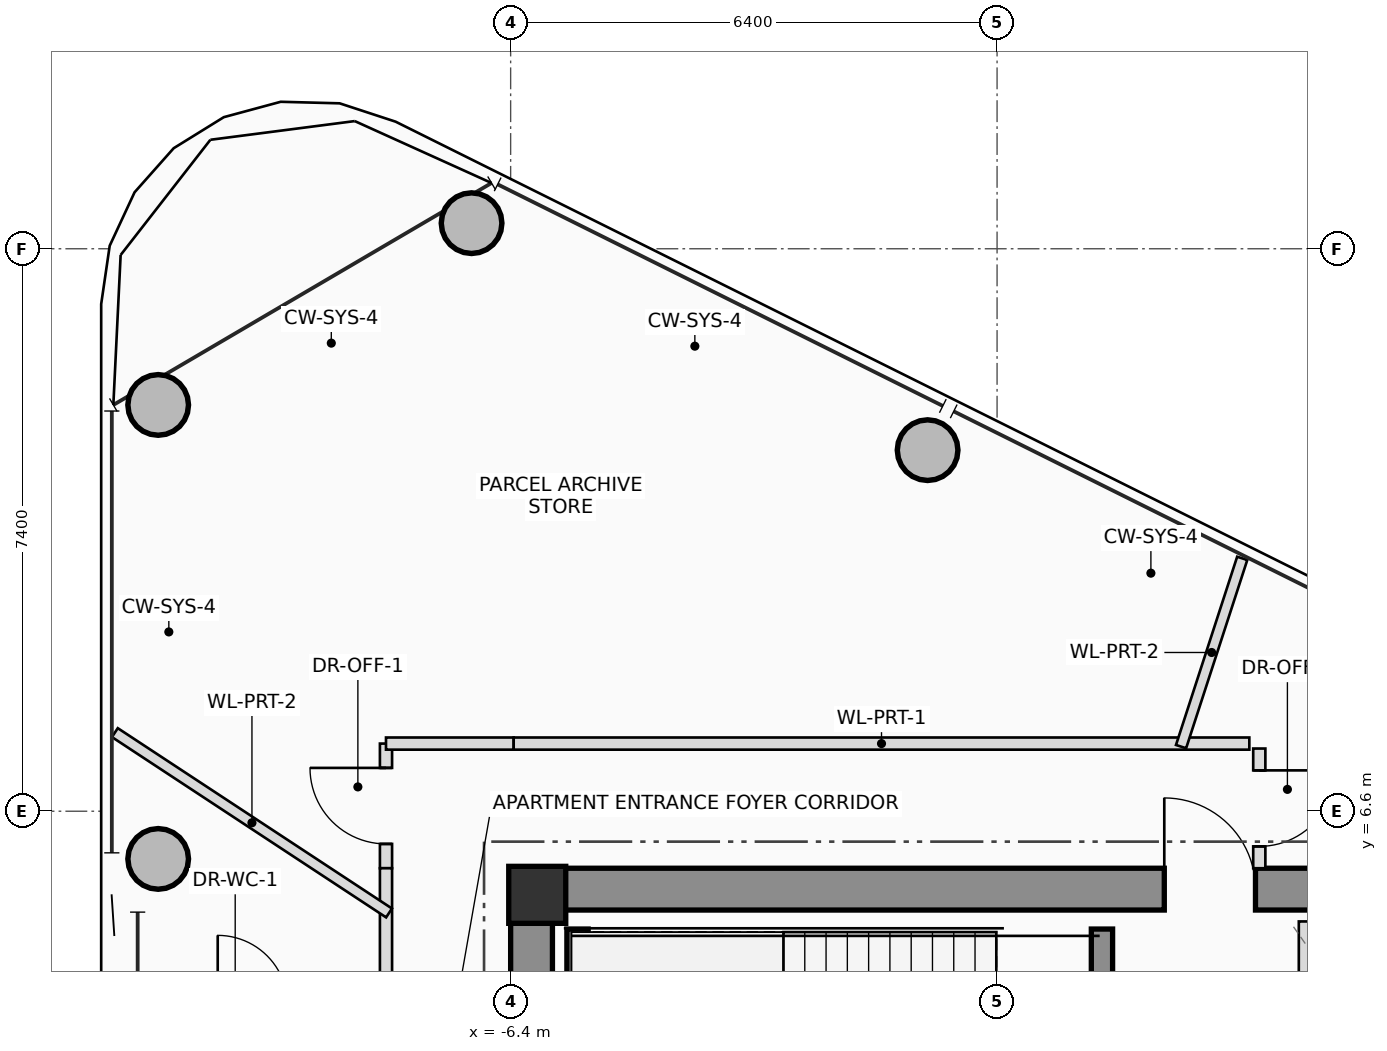
"""IFC4 building model, lengths in metres.
Left out: names, types, materials, properties, quantities, classifications, styles, units other than length and angle.
Written with IfcOpenShell. Run it as: python <this file> out.ifc"""

import sys

from ifc_helpers import new_model, si_unit, direction, frame, frame_2d, origin, origin_2d, place, context, subcontext, project, spatial, rectangle, hollow_circle, extrude, source, transform, mapped, element, fill, save


model = new_model("IFC4")
c1 = context("Model", 3, precision=1e-05, world=origin(), true_north=direction((0.0, 1.0)))
c2 = subcontext(c1, "Body", "Model", "MODEL_VIEW")
j1 = project(units=[si_unit("LENGTHUNIT", "METRE"), si_unit("PLANEANGLEUNIT", "RADIAN")], contexts=[c1])
p1 = place(None, origin())
s1 = spatial("IfcSite", under=j1, at=p1, CompositionType="ELEMENT")
p2 = place(p1, origin())
s2 = spatial("IfcBuilding", under=s1, at=p2, CompositionType="ELEMENT")
p3 = place(p2, frame((0.0, 0.0, 289.85)))
s3 = spatial("IfcBuildingStorey", under=s2, at=p3, CompositionType="ELEMENT", Elevation=289.85)
m1 = source(origin(), c2, "Body", "SweptSolid", [
    extrude(rectangle(XDim=0.75, YDim=0.75, at=origin_2d()), origin(), (0.0, 0.0, 1.0), 3.45),
])
p4 = place(p3, frame((-6.05, 5.5, 0.0), z_axis=(0.0, 0.0, 1.0), x_axis=(1.0, 0.0, 0.0)))
e1 = element("IfcColumn", 1, at=p4, inside=s3, PredefinedType="COLUMN", context=c2, shape_type="MappedRepresentation", body=[
    mapped(m1, transform((0.0, 0.0, 0.0), scale=1.0)),
])
p5 = place(p3, frame((-6.4, 5.575, 0.0), z_axis=(0.0, 0.0, 1.0), x_axis=(1.0, 0.0, 0.0)))
e2 = element("IfcWall", 2, at=p5, inside=s3, PredefinedType="SHEAR", context=c2, shape_type="SweptSolid", body=[
    extrude(rectangle(XDim=12.8, YDim=0.55, at=frame_2d((6.4, 0.0))), origin(), (0.0, 0.0, 1.0), 3.45),
])
p6 = place(p5, frame((8.6, 0.0, 0.0)))
e3 = element("IfcOpeningElement", 3, at=p6, cuts=e2, PredefinedType="OPENING", context=c2, shape_type="SweptSolid", body=[
    extrude(rectangle(XDim=1.2, YDim=2.2, at=frame_2d((0.6, 1.1))), frame((0.0, 0.285, 0.0), z_axis=(0.0, -1.0, 0.0), x_axis=(1.0, 0.0, 0.0)), (0.0, 0.0, 1.0), 0.57),
])
p7 = place(p3, frame((-6.125, 1.75, 0.0), z_axis=(0.0, 0.0, 1.0), x_axis=(0.0, 1.0, 0.0)))
e4 = element("IfcWall", 4, at=p7, inside=s3, PredefinedType="SHEAR", context=c2, shape_type="SweptSolid", body=[
    extrude(rectangle(XDim=3.55, YDim=0.55, at=frame_2d((1.775, 0.0))), origin(), (0.0, 0.0, 1.0), 3.45),
])
p8 = place(p3, frame((-5.52, 2.3, 0.0), z_axis=(0.0, 0.0, 1.0), x_axis=(0.0, 1.0, 0.0)))
e5 = element("IfcWall", 5, at=p8, inside=s3, PredefinedType="SHEAR", context=c2, shape_type="SweptSolid", body=[
    extrude(rectangle(XDim=2.75, YDim=0.28, at=frame_2d((1.375, 0.0))), origin(), (0.0, 0.0, 1.0), 3.45),
])
p9 = place(p3, frame((1.38, 4.25, 0.0), z_axis=(0.0, 0.0, 1.0), x_axis=(0.0, 1.0, 0.0)))
e6 = element("IfcWall", 6, at=p9, inside=s3, PredefinedType="SHEAR", context=c2, shape_type="SweptSolid", body=[
    extrude(rectangle(XDim=0.8, YDim=0.28, at=frame_2d((0.4, 0.0))), origin(), (0.0, 0.0, 1.0), 3.45),
])
m2 = source(origin(), c2, "Body", "SweptSolid", [
    extrude(hollow_circle(Radius=0.4, WallThickness=0.028, at=origin_2d()), origin(), (0.0, 0.0, 1.0), 3.45),
])
for number, where, z_axis, x_axis in (
    (7, (-0.914, 11.35, 0.0), (0.0, 0.0, 1.0), (1.0, 0.0, 0.0)),
    (8, (-6.914, 14.337, 0.0), (0.0, 0.0, 1.0), (1.0, 0.0, 0.0)),
    (9, (-11.037, 11.945, 0.0), (0.0, 0.0, 1.0), (1.0, 0.0, 0.0)),
    (10, (-11.037, 5.973, 0.0), (0.0, 0.0, 1.0), (1.0, 0.0, 0.0)),
):
    element("IfcColumn", number, at=place(p3, frame(where, z_axis=z_axis, x_axis=x_axis)), inside=s3, PredefinedType="COLUMN", context=c2, shape_type="MappedRepresentation", body=[
        mapped(m2, transform((0.0, 0.0, 0.0), scale=1.0)),
    ])
p10 = place(p3, frame((4.08, 2.2, 0.0), z_axis=(0.0, 0.0, 1.0), x_axis=(0.0, 1.0, 0.0)))
e11 = element("IfcWall", 11, at=p10, inside=s3, PredefinedType="PLUMBINGWALL", context=c2, shape_type="SweptSolid", body=[
    extrude(rectangle(XDim=2.95, YDim=0.22, at=frame_2d((1.475, 0.0))), origin(), (0.0, 0.0, 1.0), 3.25),
])
p11 = place(p10, frame((0.75, 0.0, 0.0)))
e12 = element("IfcOpeningElement", 12, at=p11, cuts=e11, PredefinedType="OPENING", context=c2, shape_type="SweptSolid", body=[
    extrude(rectangle(XDim=1.2, YDim=2.25, at=frame_2d((0.6, 1.125))), frame((0.0, 0.12, 0.0), z_axis=(0.0, -1.0, 0.0), x_axis=(1.0, 0.0, 0.0)), (0.0, 0.0, 1.0), 0.24),
])
p12 = place(p3, frame((-8.04, 5.85, 0.0), z_axis=(0.0, 0.0, 1.0), x_axis=(0.0, 1.0, 0.0)))
e13 = element("IfcWall", 13, at=p12, inside=s3, PredefinedType="PARTITIONING", context=c2, shape_type="SweptSolid", body=[
    extrude(rectangle(XDim=1.64, YDim=0.16, at=frame_2d((0.82, 0.0))), origin(), (0.0, 0.0, 1.0), 2.905),
])
p13 = place(p12, frame((0.32, 0.0, 0.0)))
e14 = element("IfcOpeningElement", 14, at=p13, cuts=e13, PredefinedType="OPENING", context=c2, shape_type="SweptSolid", body=[
    extrude(rectangle(XDim=1.0, YDim=2.25, at=frame_2d((0.5, 1.125))), frame((0.0, 0.09, 0.0), z_axis=(0.0, -1.0, 0.0), x_axis=(1.0, 0.0, 0.0)), (0.0, 0.0, 1.0), 0.18),
])
p14 = place(p3, frame((-8.04, 7.49, 0.0), z_axis=(0.0, 0.0, 1.0), x_axis=(1.0, 0.0, 0.0)))
e15 = element("IfcWall", 15, at=p14, inside=s3, PredefinedType="PARTITIONING", context=c2, shape_type="SweptSolid", body=[
    extrude(rectangle(XDim=1.68, YDim=0.16, at=frame_2d((0.84, 0.0))), origin(), (0.0, 0.0, 1.0), 2.655),
])
p15 = place(p3, frame((-6.36, 7.49, 0.0), z_axis=(0.0, 0.0, 1.0), x_axis=(1.0, 0.0, 0.0)))
e16 = element("IfcWall", 16, at=p15, inside=s3, PredefinedType="PARTITIONING", context=c2, shape_type="SweptSolid", body=[
    extrude(rectangle(XDim=9.679, YDim=0.16, at=frame_2d((4.84, 0.0))), origin(), (0.0, 0.0, 1.0), 2.655),
])
p16 = place(p3, frame((3.45, 7.425, 0.0), z_axis=(0.0, 0.0, 1.0), x_axis=(0.0, -1.0, 0.0)))
e17 = element("IfcWall", 17, at=p16, inside=s3, PredefinedType="PARTITIONING", context=c2, shape_type="SweptSolid", body=[
    extrude(rectangle(XDim=1.575, YDim=0.16, at=frame_2d((0.787, 0.0))), origin(), (0.0, 0.0, 1.0), 2.855),
])
p17 = place(p16, frame((0.287, 0.0, 0.0)))
e18 = element("IfcOpeningElement", 18, at=p17, cuts=e17, PredefinedType="OPENING", context=c2, shape_type="SweptSolid", body=[
    extrude(rectangle(XDim=1.0, YDim=2.25, at=frame_2d((0.5, 1.125))), frame((0.0, 0.09, 0.0), z_axis=(0.0, -1.0, 0.0), x_axis=(1.0, 0.0, 0.0)), (0.0, 0.0, 1.0), 0.18),
])
p18 = place(p3, frame((-8.04, -5.85, 0.0), z_axis=(0.0, 0.0, 1.0), x_axis=(0.0, 1.0, 0.0)))
e19 = element("IfcWall", 19, at=p18, inside=s3, PredefinedType="PARTITIONING", context=c2, shape_type="SweptSolid", body=[
    extrude(rectangle(XDim=11.7, YDim=0.16, at=frame_2d((5.85, 0.0))), origin(), (0.0, 0.0, 1.0), 2.655),
])
p19 = place(p18, frame((5.189, 0.0, 0.0)))
e20 = element("IfcOpeningElement", 20, at=p19, cuts=e19, PredefinedType="OPENING", context=c2, shape_type="SweptSolid", body=[
    extrude(rectangle(XDim=1.0, YDim=2.25, at=frame_2d((0.5, 1.125))), frame((0.0, 0.09, 0.0), z_axis=(0.0, -1.0, 0.0), x_axis=(1.0, 0.0, 0.0)), (0.0, 0.0, 1.0), 0.18),
])
p20 = place(p3, frame((2.421, 7.45, 0.0), z_axis=(0.0, 0.0, 1.0), x_axis=(0.309047920595, 0.951046467201, 0.0)))
e21 = element("IfcWall", 21, at=p20, inside=s3, PredefinedType="PARTITIONING", context=c2, shape_type="SweptSolid", body=[
    extrude(rectangle(XDim=2.604, YDim=0.14, at=frame_2d((1.302, 0.0))), origin(), (0.0, 0.0, 1.0), 2.815),
])
p21 = place(p3, frame((-8.0, 5.262, 0.0), z_axis=(0.0, 0.0, 1.0), x_axis=(-0.835496328285, 0.549496028578, 0.0)))
e22 = element("IfcWall", 22, at=p21, inside=s3, PredefinedType="PARTITIONING", context=c2, shape_type="SweptSolid", body=[
    extrude(rectangle(XDim=4.318, YDim=0.14, at=frame_2d((2.159, 0.0))), origin(), (0.0, 0.0, 1.0), 2.655),
])
p22 = place(p6, origin())
e23 = element("IfcDoor", 23, at=p22, inside=s3, OperationType="SINGLE_SWING_LEFT", PredefinedType="DOOR", context=c2, shape_type="SweptSolid", body=[
    extrude(rectangle(XDim=1.2, YDim=2.2, at=frame_2d((0.6, 1.1))), frame((0.0, 0.025, 0.0), z_axis=(0.0, -1.0, 0.0), x_axis=(1.0, 0.0, 0.0)), (0.0, 0.0, 1.0), 0.05),
])
fill(e3, e23)
p23 = place(p13, origin())
e24 = element("IfcDoor", 24, at=p23, inside=s3, OperationType="SINGLE_SWING_RIGHT", PredefinedType="DOOR", context=c2, shape_type="SweptSolid", body=[
    extrude(rectangle(XDim=1.0, YDim=2.25, at=frame_2d((0.5, 1.125))), frame((0.0, 0.025, 0.0), z_axis=(0.0, -1.0, 0.0), x_axis=(1.0, 0.0, 0.0)), (0.0, 0.0, 1.0), 0.05),
])
fill(e14, e24)
p24 = place(p17, origin())
e25 = element("IfcDoor", 25, at=p24, inside=s3, OperationType="SINGLE_SWING_LEFT", PredefinedType="DOOR", context=c2, shape_type="SweptSolid", body=[
    extrude(rectangle(XDim=1.0, YDim=2.25, at=frame_2d((0.5, 1.125))), frame((0.0, 0.025, 0.0), z_axis=(0.0, -1.0, 0.0), x_axis=(1.0, 0.0, 0.0)), (0.0, 0.0, 1.0), 0.05),
])
fill(e18, e25)
save(model, sys.argv[1])
